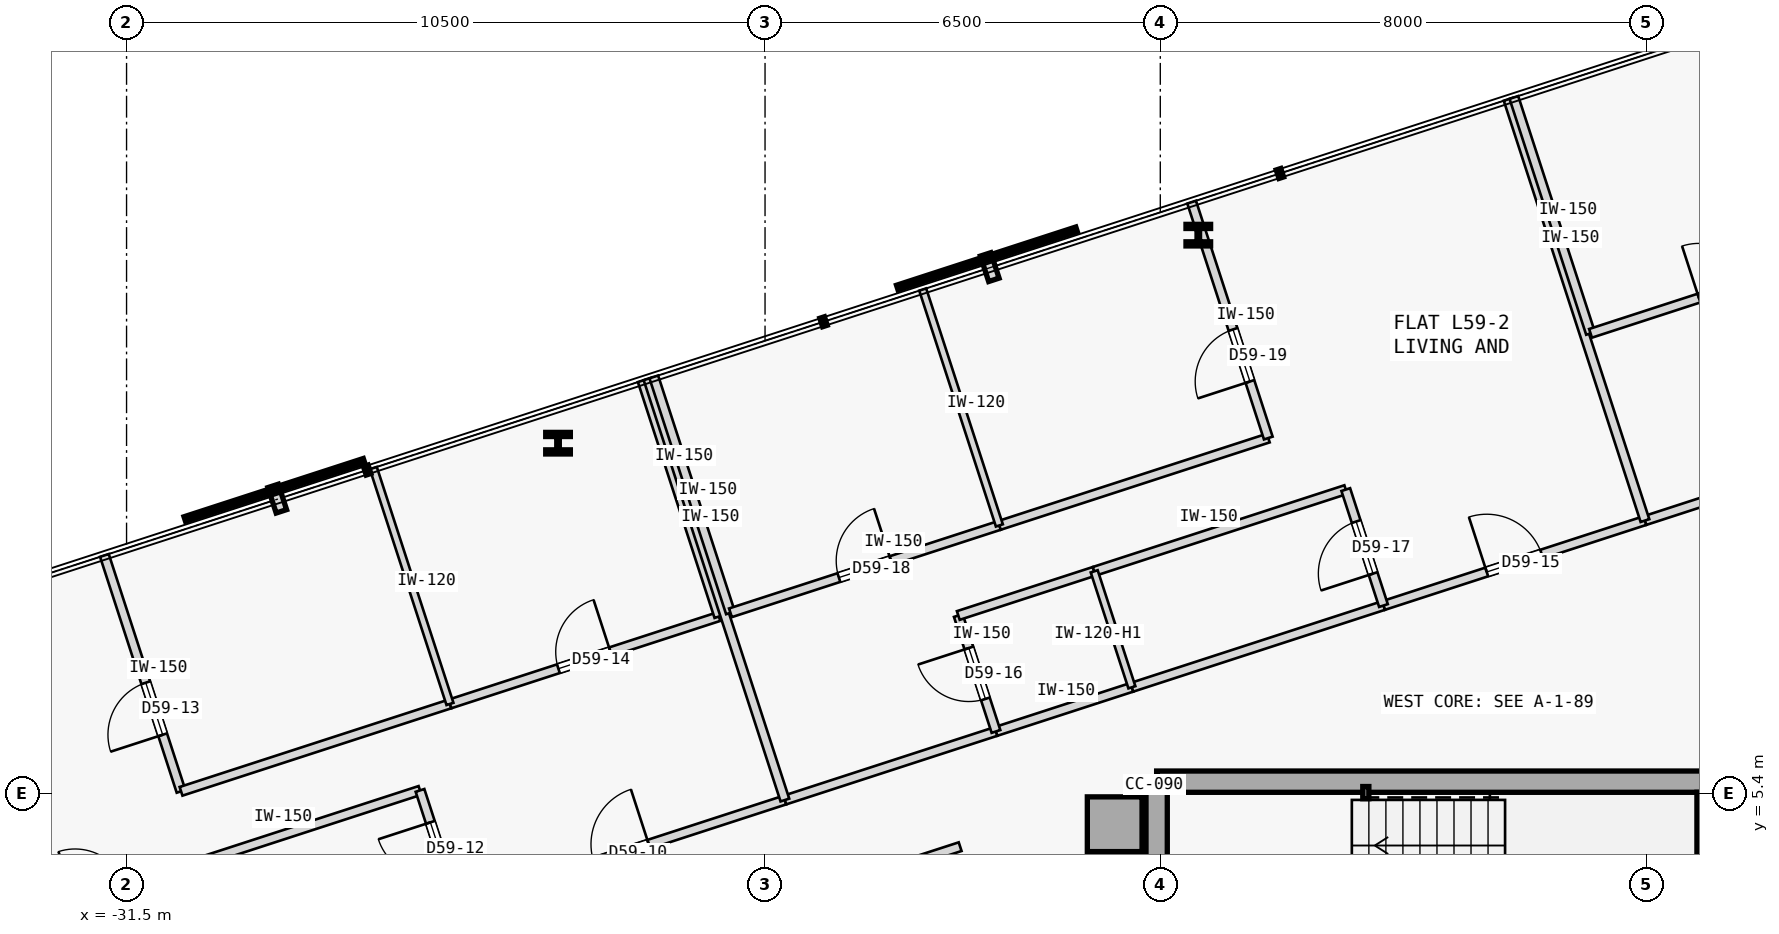
"""IFC4 building model, lengths in metres.
Left out: names, types, materials, properties, quantities, classifications, styles, units other than length and angle.
Written with IfcOpenShell. Run it as: python <this file> out.ifc"""

import sys

from ifc_helpers import new_model, si_unit, direction, frame, frame_2d, origin, origin_2d, place, context, subcontext, project, spatial, rectangle, hollow_rectangle, i_section, extrude, element, fill, save


model = new_model("IFC4")
c1 = context("Model", 3, precision=1e-05, world=origin(), true_north=direction((0.0, 1.0)))
c2 = subcontext(c1, "Body", "Model", "MODEL_VIEW")
j1 = project(units=[si_unit("LENGTHUNIT", "METRE"), si_unit("PLANEANGLEUNIT", "RADIAN")], contexts=[c1])
p1 = place(None, origin())
s1 = spatial("IfcSite", under=j1, at=p1, CompositionType="ELEMENT")
p2 = place(p1, origin())
s2 = spatial("IfcBuilding", under=s1, at=p2, CompositionType="ELEMENT")
p3 = place(p2, frame((0.0, 0.0, 224.3)))
s3 = spatial("IfcBuildingStorey", under=s2, at=p3, CompositionType="ELEMENT", Elevation=224.3)
p4 = place(p3, frame((-15.25, 4.9, 0.0), z_axis=(0.0, 0.0, 1.0), x_axis=(1.0, 0.0, 0.0)))
e1 = element("IfcColumn", 1, at=p4, inside=s3, PredefinedType="COLUMN", context=c2, shape_type="SweptSolid", body=[
    extrude(rectangle(XDim=0.9, YDim=0.9, at=origin_2d()), origin(), (0.0, 0.0, 1.0), 3.35),
])
p5 = place(p3, frame((-14.56, 5.6, 0.0), z_axis=(0.0, 0.0, 1.0), x_axis=(1.0, 0.0, 0.0)))
e2 = element("IfcWall", 2, at=p5, inside=s3, PredefinedType="SHEAR", context=c2, shape_type="SweptSolid", body=[
    extrude(rectangle(XDim=11.41, YDim=0.35, at=frame_2d((5.705, 0.0))), origin(), (0.0, 0.0, 1.0), 3.125),
])
p6 = place(p3, frame((-14.56, -5.425, 0.0), z_axis=(0.0, 0.0, 1.0), x_axis=(0.0, 1.0, 0.0)))
e3 = element("IfcWall", 3, at=p6, inside=s3, PredefinedType="SHEAR", context=c2, shape_type="SweptSolid", body=[
    extrude(rectangle(XDim=10.85, YDim=0.35, at=frame_2d((5.425, 0.0))), origin(), (0.0, 0.0, 1.0), 3.125),
])
p7 = place(p3, frame((-5.5, 2.15, 0.0), z_axis=(0.0, 0.0, 1.0), x_axis=(0.0, 1.0, 0.0)))
e4 = element("IfcWall", 4, at=p7, inside=s3, PredefinedType="SHEAR", context=c2, shape_type="SweptSolid", body=[
    extrude(rectangle(XDim=3.275, YDim=0.35, at=frame_2d((1.638, 0.0))), origin(), (0.0, 0.0, 1.0), 3.125),
])
p8 = place(p3, frame((-11.12, 5.42, 0.0), z_axis=(0.0, 0.0, 1.0), x_axis=(1.0, 0.0, 0.0)))
e5 = element("IfcColumn", 5, at=p8, inside=s3, PredefinedType="COLUMN", context=c2, shape_type="SweptSolid", body=[
    extrude(hollow_rectangle(XDim=0.1, YDim=0.2, WallThickness=0.008, at=origin_2d()), origin(), (0.0, 0.0, 1.0), 3.35),
])
for number, where, z_axis, x_axis in (
    (6, (-13.875, 14.587, 0.0), (0.0, 0.0, 1.0), (1.0, 0.0, 0.0)),
    (7, (-24.404, 11.166, 0.0), (0.0, 0.0, 1.0), (1.0, 0.0, 0.0)),
):
    element("IfcColumn", number, at=place(p3, frame(where, z_axis=z_axis, x_axis=x_axis)), inside=s3, PredefinedType="COLUMN", context=c2, shape_type="SweptSolid", body=[
        extrude(i_section(OverallWidth=0.405, OverallDepth=0.355, WebThickness=0.042, FlangeThickness=0.068, FilletRadius=0.015, at=origin_2d()), origin(), (0.0, 0.0, 1.0), 3.35),
    ])
p9 = place(p3, frame((-26.055, 3.55, 0.0), z_axis=(0.0, 0.0, 1.0), x_axis=(0.951063554534, 0.308995332064, 0.0)))
e8 = element("IfcWall", 8, at=p9, inside=s3, PredefinedType="PARTITIONING", context=c2, shape_type="SweptSolid", body=[
    extrude(rectangle(XDim=5.658, YDim=0.15, at=frame_2d((2.829, 0.0))), origin(), (0.0, 0.0, 1.0), 3.125),
])
p10 = place(p9, frame((2.354, 0.0, 0.0)))
e9 = element("IfcOpeningElement", 9, at=p10, cuts=e8, PredefinedType="OPENING", context=c2, shape_type="SweptSolid", body=[
    extrude(rectangle(XDim=0.95, YDim=2.15, at=frame_2d((0.475, 1.075))), frame((0.0, 0.085, 0.0), z_axis=(0.0, -1.0, 0.0), x_axis=(1.0, 0.0, 0.0)), (0.0, 0.0, 1.0), 0.17),
])
p11 = place(p3, frame((-20.674, 5.298, 0.0), z_axis=(0.0, 0.0, 1.0), x_axis=(0.951057168147, 0.309014988174, 0.0)))
e10 = element("IfcWall", 10, at=p11, inside=s3, PredefinedType="PARTITIONING", context=c2, shape_type="SweptSolid", body=[
    extrude(rectangle(XDim=3.65, YDim=0.15, at=frame_2d((1.825, 0.0))), origin(), (0.0, 0.0, 1.0), 3.125),
])
p12 = place(p3, frame((-10.83, 8.496, 0.0), z_axis=(0.0, 0.0, 1.0), x_axis=(0.951063822327, 0.308994507816, 0.0)))
e11 = element("IfcWall", 11, at=p12, inside=s3, PredefinedType="PARTITIONING", context=c2, shape_type="SweptSolid", body=[
    extrude(rectangle(XDim=4.522, YDim=0.15, at=frame_2d((2.261, 0.0))), origin(), (0.0, 0.0, 1.0), 3.125),
])
p13 = place(p12, frame((1.786, 0.0, 0.0)))
e12 = element("IfcOpeningElement", 12, at=p13, cuts=e11, PredefinedType="OPENING", context=c2, shape_type="SweptSolid", body=[
    extrude(rectangle(XDim=0.95, YDim=2.15, at=frame_2d((0.475, 1.075))), frame((0.0, 0.085, 0.0), z_axis=(0.0, -1.0, 0.0), x_axis=(1.0, 0.0, 0.0)), (0.0, 0.0, 1.0), 0.17),
])
p14 = place(p3, frame((-17.202, 6.426, 0.0), z_axis=(0.0, 0.0, 1.0), x_axis=(0.951035595692, 0.309081373955, 0.0)))
e13 = element("IfcWall", 13, at=p14, inside=s3, PredefinedType="PARTITIONING", context=c2, shape_type="SweptSolid", body=[
    extrude(rectangle(XDim=2.35, YDim=0.15, at=frame_2d((1.175, 0.0))), origin(), (0.0, 0.0, 1.0), 3.125),
])
p15 = place(p3, frame((-14.967, 7.152, 0.0), z_axis=(0.0, 0.0, 1.0), x_axis=(0.951057987102, 0.309012467661, 0.0)))
e14 = element("IfcWall", 14, at=p15, inside=s3, PredefinedType="PARTITIONING", context=c2, shape_type="SweptSolid", body=[
    extrude(rectangle(XDim=4.35, YDim=0.15, at=frame_2d((2.175, 0.0))), origin(), (0.0, 0.0, 1.0), 3.125),
])
p16 = place(p3, frame((-6.53, 9.894, 0.0), z_axis=(0.0, 0.0, 1.0), x_axis=(0.951057168147, 0.309014988174, 0.0)))
e15 = element("IfcWall", 15, at=p16, inside=s3, PredefinedType="PARTITIONING", context=c2, shape_type="SweptSolid", body=[
    extrude(rectangle(XDim=3.65, YDim=0.15, at=frame_2d((1.825, 0.0))), origin(), (0.0, 0.0, 1.0), 3.125),
])
p17 = place(p3, frame((-33.633, -0.616, 0.0), z_axis=(0.0, 0.0, 1.0), x_axis=(0.951058192995, 0.309011833974, 0.0)))
e16 = element("IfcWall", 16, at=p17, inside=s3, PredefinedType="PARTITIONING", context=c2, shape_type="SweptSolid", body=[
    extrude(rectangle(XDim=16.657, YDim=0.15, at=frame_2d((8.329, 0.0))), origin(), (0.0, 0.0, 1.0), 3.125),
])
p18 = place(p17, frame((7.868, 0.0, 0.0)))
e17 = element("IfcOpeningElement", 17, at=p18, cuts=e16, PredefinedType="OPENING", context=c2, shape_type="SweptSolid", body=[
    extrude(rectangle(XDim=0.92, YDim=2.15, at=frame_2d((0.46, 1.075))), frame((0.0, 0.085, 0.0), z_axis=(0.0, -1.0, 0.0), x_axis=(1.0, 0.0, 0.0)), (0.0, 0.0, 1.0), 0.17),
])
p19 = place(p3, frame((-30.811, 4.112, 0.0), z_axis=(0.0, 0.0, 1.0), x_axis=(0.951069122051, 0.308978195154, 0.0)))
e18 = element("IfcWall", 18, at=p19, inside=s3, PredefinedType="PARTITIONING", context=c2, shape_type="SweptSolid", body=[
    extrude(rectangle(XDim=4.35, YDim=0.15, at=frame_2d((2.175, 0.0))), origin(), (0.0, 0.0, 1.0), 3.125),
])
p20 = place(p3, frame((-26.055, 3.55, 0.0), z_axis=(0.0, 0.0, 1.0), x_axis=(-0.309058537449, 0.951043017129, 0.0)))
e19 = element("IfcWall", 19, at=p20, inside=s3, PredefinedType="PARTITIONING", context=c2, shape_type="SweptSolid", body=[
    extrude(rectangle(XDim=2.005, YDim=0.15, at=frame_2d((1.002, 0.0))), origin(), (0.0, 0.0, 1.0), 3.125),
])
p21 = place(p20, frame((0.552, 0.0, 0.0)))
e20 = element("IfcOpeningElement", 20, at=p21, cuts=e19, PredefinedType="OPENING", context=c2, shape_type="SweptSolid", body=[
    extrude(rectangle(XDim=0.9, YDim=2.15, at=frame_2d((0.45, 1.075))), frame((0.0, 0.085, 0.0), z_axis=(0.0, -1.0, 0.0), x_axis=(1.0, 0.0, 0.0)), (0.0, 0.0, 1.0), 0.17),
])
p22 = place(p3, frame((-30.604, 5.441, 0.0), z_axis=(0.0, 0.0, 1.0), x_axis=(-0.309018403393, 0.951056058476, 0.0)))
e21 = element("IfcWall", 21, at=p22, inside=s3, PredefinedType="PARTITIONING", context=c2, shape_type="SweptSolid", body=[
    extrude(rectangle(XDim=4.079, YDim=0.15, at=frame_2d((2.04, 0.0))), origin(), (0.0, 0.0, 1.0), 3.125),
])
p23 = place(p22, frame((0.978, 0.0, 0.0)))
e22 = element("IfcOpeningElement", 22, at=p23, cuts=e21, PredefinedType="OPENING", context=c2, shape_type="SweptSolid", body=[
    extrude(rectangle(XDim=0.9, YDim=2.15, at=frame_2d((0.45, 1.075))), frame((0.0, 0.085, 0.0), z_axis=(0.0, -1.0, 0.0), x_axis=(1.0, 0.0, 0.0)), (0.0, 0.0, 1.0), 0.17),
])
p24 = place(p3, frame((-30.604, 5.441, 0.0), z_axis=(0.0, 0.0, 1.0), x_axis=(0.951070715387, 0.308973290646, 0.0)))
e23 = element("IfcWall", 23, at=p24, inside=s3, PredefinedType="PARTITIONING", context=c2, shape_type="SweptSolid", body=[
    extrude(rectangle(XDim=4.65, YDim=0.15, at=frame_2d((2.325, 0.0))), origin(), (0.0, 0.0, 1.0), 3.125),
])
p25 = place(p3, frame((-26.181, 6.878, 0.0), z_axis=(0.0, 0.0, 1.0), x_axis=(0.951050272606, 0.309036209813, 0.0)))
e24 = element("IfcWall", 24, at=p25, inside=s3, PredefinedType="PARTITIONING", context=c2, shape_type="SweptSolid", body=[
    extrude(rectangle(XDim=4.65, YDim=0.15, at=frame_2d((2.325, 0.0))), origin(), (0.0, 0.0, 1.0), 3.125),
])
p26 = place(p25, frame((1.875, 0.0, 0.0)))
e25 = element("IfcOpeningElement", 25, at=p26, cuts=e24, PredefinedType="OPENING", context=c2, shape_type="SweptSolid", body=[
    extrude(rectangle(XDim=0.9, YDim=2.15, at=frame_2d((0.45, 1.075))), frame((0.0, 0.085, 0.0), z_axis=(0.0, -1.0, 0.0), x_axis=(1.0, 0.0, 0.0)), (0.0, 0.0, 1.0), 0.17),
])
p27 = place(p3, frame((-21.759, 8.315, 0.0), z_axis=(0.0, 0.0, 1.0), x_axis=(-0.309018403393, 0.951056058476, 0.0)))
e26 = element("IfcWall", 26, at=p27, inside=s3, PredefinedType="PARTITIONING", context=c2, shape_type="SweptSolid", body=[
    extrude(rectangle(XDim=4.079, YDim=0.15, at=frame_2d((2.04, 0.0))), origin(), (0.0, 0.0, 1.0), 3.125),
])
p28 = place(p3, frame((-20.674, 5.298, 0.0), z_axis=(0.0, 0.0, 1.0), x_axis=(-0.309029230739, 0.951052540372, 0.0)))
e27 = element("IfcWall", 27, at=p28, inside=s3, PredefinedType="PARTITIONING", context=c2, shape_type="SweptSolid", body=[
    extrude(rectangle(XDim=7.284, YDim=0.15, at=frame_2d((3.642, 0.0))), origin(), (0.0, 0.0, 1.0), 3.125),
])
p29 = place(p3, frame((-26.181, 6.878, 0.0), z_axis=(0.0, 0.0, 1.0), x_axis=(-0.309018403393, 0.951056058476, 0.0)))
e28 = element("IfcWall", 28, at=p29, inside=s3, PredefinedType="PARTITIONING", context=c2, shape_type="SweptSolid", body=[
    extrude(rectangle(XDim=4.079, YDim=0.12, at=frame_2d((2.04, 0.0))), origin(), (0.0, 0.0, 1.0), 3.125),
])
p30 = place(p3, frame((-17.202, 6.426, 0.0), z_axis=(0.0, 0.0, 1.0), x_axis=(-0.309022749039, 0.951054646472, 0.0)))
e29 = element("IfcWall", 29, at=p30, inside=s3, PredefinedType="PARTITIONING", context=c2, shape_type="SweptSolid", body=[
    extrude(rectangle(XDim=2.005, YDim=0.15, at=frame_2d((1.002, 0.0))), origin(), (0.0, 0.0, 1.0), 3.125),
])
p31 = place(p30, frame((0.562, 0.0, 0.0)))
e30 = element("IfcOpeningElement", 30, at=p31, cuts=e29, PredefinedType="OPENING", context=c2, shape_type="SweptSolid", body=[
    extrude(rectangle(XDim=0.88, YDim=2.15, at=frame_2d((0.44, 1.075))), frame((0.0, 0.085, 0.0), z_axis=(0.0, -1.0, 0.0), x_axis=(1.0, 0.0, 0.0)), (0.0, 0.0, 1.0), 0.17),
])
p32 = place(p3, frame((-17.822, 8.333, 0.0), z_axis=(0.0, 0.0, 1.0), x_axis=(0.951066131077, 0.308987401554, 0.0)))
e31 = element("IfcWall", 31, at=p32, inside=s3, PredefinedType="PARTITIONING", context=c2, shape_type="SweptSolid", body=[
    extrude(rectangle(XDim=2.35, YDim=0.15, at=frame_2d((1.175, 0.0))), origin(), (0.0, 0.0, 1.0), 3.125),
])
p33 = place(p3, frame((-15.587, 9.059, 0.0), z_axis=(0.0, 0.0, 1.0), x_axis=(0.951057987102, 0.309012467661, 0.0)))
e32 = element("IfcWall", 32, at=p33, inside=s3, PredefinedType="PARTITIONING", context=c2, shape_type="SweptSolid", body=[
    extrude(rectangle(XDim=4.35, YDim=0.15, at=frame_2d((2.175, 0.0))), origin(), (0.0, 0.0, 1.0), 3.125),
])
p34 = place(p3, frame((-10.83, 8.496, 0.0), z_axis=(0.0, 0.0, 1.0), x_axis=(-0.309058537449, 0.951043017129, 0.0)))
e33 = element("IfcWall", 33, at=p34, inside=s3, PredefinedType="PARTITIONING", context=c2, shape_type="SweptSolid", body=[
    extrude(rectangle(XDim=2.005, YDim=0.15, at=frame_2d((1.002, 0.0))), origin(), (0.0, 0.0, 1.0), 3.125),
])
p35 = place(p34, frame((0.552, 0.0, 0.0)))
e34 = element("IfcOpeningElement", 34, at=p35, cuts=e33, PredefinedType="OPENING", context=c2, shape_type="SweptSolid", body=[
    extrude(rectangle(XDim=0.9, YDim=2.15, at=frame_2d((0.45, 1.075))), frame((0.0, 0.085, 0.0), z_axis=(0.0, -1.0, 0.0), x_axis=(1.0, 0.0, 0.0)), (0.0, 0.0, 1.0), 0.17),
])
p36 = place(p3, frame((-21.569, 8.377, 0.0), z_axis=(0.0, 0.0, 1.0), x_axis=(-0.309018403393, 0.951056058476, 0.0)))
e35 = element("IfcWall", 35, at=p36, inside=s3, PredefinedType="PARTITIONING", context=c2, shape_type="SweptSolid", body=[
    extrude(rectangle(XDim=4.079, YDim=0.15, at=frame_2d((2.04, 0.0))), origin(), (0.0, 0.0, 1.0), 3.125),
])
p37 = place(p3, frame((-21.569, 8.377, 0.0), z_axis=(0.0, 0.0, 1.0), x_axis=(0.951050272606, 0.309036209813, 0.0)))
e36 = element("IfcWall", 36, at=p37, inside=s3, PredefinedType="PARTITIONING", context=c2, shape_type="SweptSolid", body=[
    extrude(rectangle(XDim=4.65, YDim=0.15, at=frame_2d((2.325, 0.0))), origin(), (0.0, 0.0, 1.0), 3.125),
])
p38 = place(p37, frame((1.875, 0.0, 0.0)))
e37 = element("IfcOpeningElement", 37, at=p38, cuts=e36, PredefinedType="OPENING", context=c2, shape_type="SweptSolid", body=[
    extrude(rectangle(XDim=0.9, YDim=2.15, at=frame_2d((0.45, 1.075))), frame((0.0, 0.085, 0.0), z_axis=(0.0, -1.0, 0.0), x_axis=(1.0, 0.0, 0.0)), (0.0, 0.0, 1.0), 0.17),
])
p39 = place(p3, frame((-17.146, 9.814, 0.0), z_axis=(0.0, 0.0, 1.0), x_axis=(0.951065702951, 0.308988719326, 0.0)))
e38 = element("IfcWall", 38, at=p39, inside=s3, PredefinedType="PARTITIONING", context=c2, shape_type="SweptSolid", body=[
    extrude(rectangle(XDim=4.65, YDim=0.15, at=frame_2d((2.325, 0.0))), origin(), (0.0, 0.0, 1.0), 3.125),
])
p40 = place(p3, frame((-12.724, 11.251, 0.0), z_axis=(0.0, 0.0, 1.0), x_axis=(-0.309018403393, 0.951056058476, 0.0)))
e39 = element("IfcWall", 39, at=p40, inside=s3, PredefinedType="PARTITIONING", context=c2, shape_type="SweptSolid", body=[
    extrude(rectangle(XDim=4.079, YDim=0.15, at=frame_2d((2.04, 0.0))), origin(), (0.0, 0.0, 1.0), 3.125),
])
p41 = place(p40, frame((0.978, 0.0, 0.0)))
e40 = element("IfcOpeningElement", 40, at=p41, cuts=e39, PredefinedType="OPENING", context=c2, shape_type="SweptSolid", body=[
    extrude(rectangle(XDim=0.9, YDim=2.15, at=frame_2d((0.45, 1.075))), frame((0.0, 0.085, 0.0), z_axis=(0.0, -1.0, 0.0), x_axis=(1.0, 0.0, 0.0)), (0.0, 0.0, 1.0), 0.17),
])
p42 = place(p3, frame((-6.53, 9.894, 0.0), z_axis=(0.0, 0.0, 1.0), x_axis=(-0.308998913866, 0.951062390819, 0.0)))
e41 = element("IfcWall", 41, at=p42, inside=s3, PredefinedType="PARTITIONING", context=c2, shape_type="SweptSolid", body=[
    extrude(rectangle(XDim=7.284, YDim=0.15, at=frame_2d((3.642, 0.0))), origin(), (0.0, 0.0, 1.0), 3.125),
])
p43 = place(p3, frame((-14.967, 7.152, 0.0), z_axis=(0.0, 0.0, 1.0), x_axis=(-0.309058537449, 0.951043017129, 0.0)))
e42 = element("IfcWall", 42, at=p43, inside=s3, PredefinedType="PARTITIONING", context=c2, shape_type="SweptSolid", body=[
    extrude(rectangle(XDim=2.005, YDim=0.12, at=frame_2d((1.002, 0.0))), origin(), (0.0, 0.0, 1.0), 2.675),
])
p44 = place(p3, frame((-17.146, 9.814, 0.0), z_axis=(0.0, 0.0, 1.0), x_axis=(-0.309018403393, 0.951056058476, 0.0)))
e43 = element("IfcWall", 43, at=p44, inside=s3, PredefinedType="PARTITIONING", context=c2, shape_type="SweptSolid", body=[
    extrude(rectangle(XDim=4.079, YDim=0.12, at=frame_2d((2.04, 0.0))), origin(), (0.0, 0.0, 1.0), 3.125),
])
p45 = place(p3, frame((-7.425, 12.973, 0.0), z_axis=(0.0, 0.0, 1.0), x_axis=(-0.309018403393, 0.951056058476, 0.0)))
e44 = element("IfcWall", 44, at=p45, inside=s3, PredefinedType="PARTITIONING", context=c2, shape_type="SweptSolid", body=[
    extrude(rectangle(XDim=4.079, YDim=0.15, at=frame_2d((2.04, 0.0))), origin(), (0.0, 0.0, 1.0), 3.125),
])
p46 = place(p3, frame((-7.425, 12.973, 0.0), z_axis=(0.0, 0.0, 1.0), x_axis=(0.951055286502, 0.309020779263, 0.0)))
e45 = element("IfcWall", 45, at=p46, inside=s3, PredefinedType="PARTITIONING", context=c2, shape_type="SweptSolid", body=[
    extrude(rectangle(XDim=4.65, YDim=0.15, at=frame_2d((2.325, 0.0))), origin(), (0.0, 0.0, 1.0), 3.125),
])
p47 = place(p46, frame((1.875, 0.0, 0.0)))
e46 = element("IfcOpeningElement", 46, at=p47, cuts=e45, PredefinedType="OPENING", context=c2, shape_type="SweptSolid", body=[
    extrude(rectangle(XDim=0.9, YDim=2.15, at=frame_2d((0.45, 1.075))), frame((0.0, 0.085, 0.0), z_axis=(0.0, -1.0, 0.0), x_axis=(1.0, 0.0, 0.0)), (0.0, 0.0, 1.0), 0.17),
])
p48 = place(p10, origin())
e47 = element("IfcDoor", 47, at=p48, inside=s3, OperationType="SINGLE_SWING_RIGHT", PredefinedType="DOOR", context=c2, shape_type="SweptSolid", body=[
    extrude(rectangle(XDim=0.95, YDim=2.15, at=frame_2d((0.475, 1.075))), frame((0.0, 0.025, 0.0), z_axis=(0.0, -1.0, 0.0), x_axis=(1.0, 0.0, 0.0)), (0.0, 0.0, 1.0), 0.05),
])
fill(e9, e47)
p49 = place(p21, origin())
e48 = element("IfcDoor", 48, at=p49, inside=s3, OperationType="SINGLE_SWING_RIGHT", PredefinedType="DOOR", context=c2, shape_type="SweptSolid", body=[
    extrude(rectangle(XDim=0.9, YDim=2.15, at=frame_2d((0.45, 1.075))), frame((0.0, 0.025, 0.0), z_axis=(0.0, -1.0, 0.0), x_axis=(1.0, 0.0, 0.0)), (0.0, 0.0, 1.0), 0.05),
])
fill(e20, e48)
p50 = place(p23, origin())
e49 = element("IfcDoor", 49, at=p50, inside=s3, OperationType="SINGLE_SWING_LEFT", PredefinedType="DOOR", context=c2, shape_type="SweptSolid", body=[
    extrude(rectangle(XDim=0.9, YDim=2.15, at=frame_2d((0.45, 1.075))), frame((0.0, 0.025, 0.0), z_axis=(0.0, -1.0, 0.0), x_axis=(1.0, 0.0, 0.0)), (0.0, 0.0, 1.0), 0.05),
])
fill(e22, e49)
p51 = place(p26, origin())
e50 = element("IfcDoor", 50, at=p51, inside=s3, OperationType="SINGLE_SWING_RIGHT", PredefinedType="DOOR", context=c2, shape_type="SweptSolid", body=[
    extrude(rectangle(XDim=0.9, YDim=2.15, at=frame_2d((0.45, 1.075))), frame((0.0, 0.025, 0.0), z_axis=(0.0, -1.0, 0.0), x_axis=(1.0, 0.0, 0.0)), (0.0, 0.0, 1.0), 0.05),
])
fill(e25, e50)
p52 = place(p13, origin())
e51 = element("IfcDoor", 51, at=p52, inside=s3, OperationType="SINGLE_SWING_LEFT", PredefinedType="DOOR", context=c2, shape_type="SweptSolid", body=[
    extrude(rectangle(XDim=0.95, YDim=2.15, at=frame_2d((0.475, 1.075))), frame((0.0, 0.025, 0.0), z_axis=(0.0, -1.0, 0.0), x_axis=(1.0, 0.0, 0.0)), (0.0, 0.0, 1.0), 0.05),
])
fill(e12, e51)
p53 = place(p31, origin())
e52 = element("IfcDoor", 52, at=p53, inside=s3, OperationType="SINGLE_SWING_RIGHT", PredefinedType="DOOR", context=c2, shape_type="SweptSolid", body=[
    extrude(rectangle(XDim=0.88, YDim=2.15, at=frame_2d((0.44, 1.075))), frame((0.0, 0.025, 0.0), z_axis=(0.0, -1.0, 0.0), x_axis=(1.0, 0.0, 0.0)), (0.0, 0.0, 1.0), 0.05),
])
fill(e30, e52)
p54 = place(p35, origin())
e53 = element("IfcDoor", 53, at=p54, inside=s3, OperationType="SINGLE_SWING_LEFT", PredefinedType="DOOR", context=c2, shape_type="SweptSolid", body=[
    extrude(rectangle(XDim=0.9, YDim=2.15, at=frame_2d((0.45, 1.075))), frame((0.0, 0.025, 0.0), z_axis=(0.0, -1.0, 0.0), x_axis=(1.0, 0.0, 0.0)), (0.0, 0.0, 1.0), 0.05),
])
fill(e34, e53)
p55 = place(p38, origin())
e54 = element("IfcDoor", 54, at=p55, inside=s3, OperationType="SINGLE_SWING_RIGHT", PredefinedType="DOOR", context=c2, shape_type="SweptSolid", body=[
    extrude(rectangle(XDim=0.9, YDim=2.15, at=frame_2d((0.45, 1.075))), frame((0.0, 0.025, 0.0), z_axis=(0.0, -1.0, 0.0), x_axis=(1.0, 0.0, 0.0)), (0.0, 0.0, 1.0), 0.05),
])
fill(e37, e54)
p56 = place(p41, origin())
e55 = element("IfcDoor", 55, at=p56, inside=s3, OperationType="SINGLE_SWING_LEFT", PredefinedType="DOOR", context=c2, shape_type="SweptSolid", body=[
    extrude(rectangle(XDim=0.9, YDim=2.15, at=frame_2d((0.45, 1.075))), frame((0.0, 0.025, 0.0), z_axis=(0.0, -1.0, 0.0), x_axis=(1.0, 0.0, 0.0)), (0.0, 0.0, 1.0), 0.05),
])
fill(e40, e55)
p57 = place(p47, origin())
e56 = element("IfcDoor", 56, at=p57, inside=s3, OperationType="SINGLE_SWING_LEFT", PredefinedType="DOOR", context=c2, shape_type="SweptSolid", body=[
    extrude(rectangle(XDim=0.9, YDim=2.15, at=frame_2d((0.45, 1.075))), frame((0.0, 0.025, 0.0), z_axis=(0.0, -1.0, 0.0), x_axis=(1.0, 0.0, 0.0)), (0.0, 0.0, 1.0), 0.05),
])
fill(e46, e56)
save(model, sys.argv[1])
